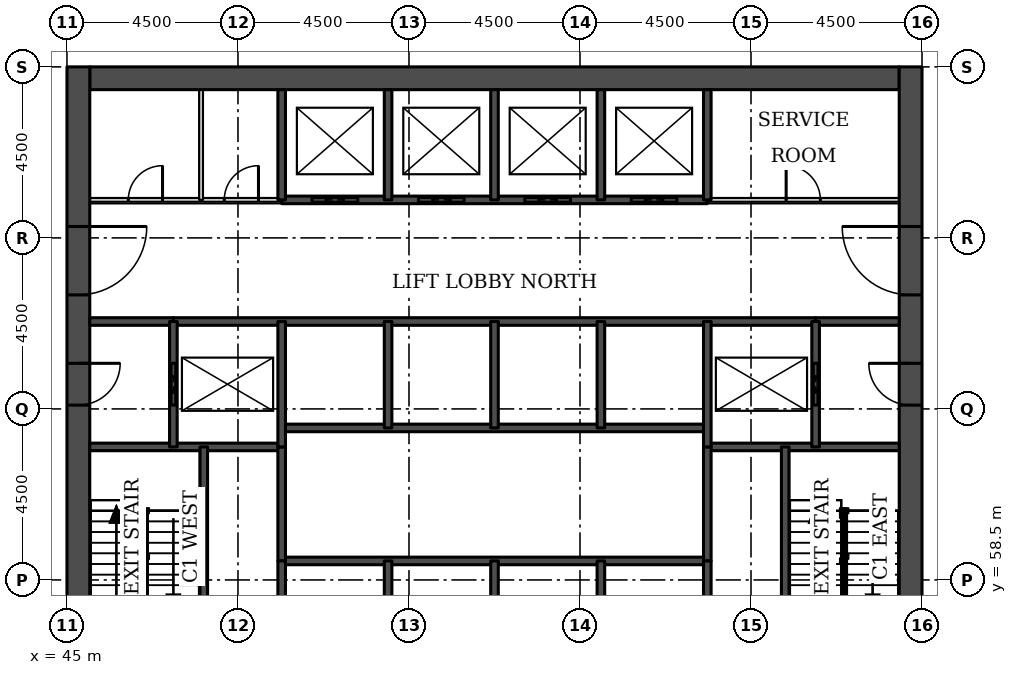
"""IFC4 building model, lengths in metres.
Left out: names, types, materials, properties, quantities, classifications, styles, units other than length and angle.
Written with IfcOpenShell. Run it as: python <this file> out.ifc"""

import sys

from ifc_helpers import new_model, si_unit, direction, frame, frame_2d, origin, place, context, subcontext, project, spatial, rectangle, extrude, element, fill, save


model = new_model("IFC4")
c1 = context("Model", 3, precision=1e-05, world=origin(), true_north=direction((0.0, 1.0)))
c2 = subcontext(c1, "Body", "Model", "MODEL_VIEW")
j1 = project(units=[si_unit("LENGTHUNIT", "METRE"), si_unit("PLANEANGLEUNIT", "RADIAN")], contexts=[c1])
p1 = place(None, origin())
s1 = spatial("IfcSite", under=j1, at=p1, CompositionType="ELEMENT")
p2 = place(p1, origin())
s2 = spatial("IfcBuilding", under=s1, at=p2, CompositionType="ELEMENT")
p3 = place(p2, frame((0.0, 0.0, 8.0)))
s3 = spatial("IfcBuildingStorey", under=s2, at=p3, CompositionType="ELEMENT", Elevation=8.0)
p4 = place(p3, frame((45.6, 71.7, 0.0), z_axis=(0.0, 0.0, 1.0), x_axis=(1.0, 0.0, 0.0)))
e1 = element("IfcWall", 1, at=p4, inside=s3, PredefinedType="SHEAR", context=c2, shape_type="SweptSolid", body=[
    extrude(rectangle(XDim=21.3, YDim=0.6, at=frame_2d((10.65, 0.0))), origin(), (0.0, 0.0, 1.0), 5.5),
])
p5 = place(p3, frame((45.3, 49.5, 0.0), z_axis=(0.0, 0.0, 1.0), x_axis=(0.0, 1.0, 0.0)))
e2 = element("IfcWall", 2, at=p5, inside=s3, PredefinedType="SHEAR", context=c2, shape_type="SweptSolid", body=[
    extrude(rectangle(XDim=22.5, YDim=0.6, at=frame_2d((11.25, 0.0))), origin(), (0.0, 0.0, 1.0), 5.5),
])
p6 = place(p5, frame((4.2, 0.0, 0.0)))
e3 = element("IfcOpeningElement", 3, at=p6, cuts=e2, PredefinedType="OPENING", context=c2, shape_type="SweptSolid", body=[
    extrude(rectangle(XDim=1.8, YDim=2.1, at=frame_2d((0.9, 1.05))), frame((0.0, 0.31, 0.0), z_axis=(0.0, -1.0, 0.0), x_axis=(1.0, 0.0, 0.0)), (0.0, 0.0, 1.0), 0.62),
])
p7 = place(p5, frame((6.9, 0.0, 0.0)))
e4 = element("IfcOpeningElement", 4, at=p7, cuts=e2, PredefinedType="OPENING", context=c2, shape_type="SweptSolid", body=[
    extrude(rectangle(XDim=1.1, YDim=2.1, at=frame_2d((0.55, 1.05))), frame((0.0, 0.31, 0.0), z_axis=(0.0, -1.0, 0.0), x_axis=(1.0, 0.0, 0.0)), (0.0, 0.0, 1.0), 0.62),
])
p8 = place(p5, frame((13.6, 0.0, 0.0)))
e5 = element("IfcOpeningElement", 5, at=p8, cuts=e2, PredefinedType="OPENING", context=c2, shape_type="SweptSolid", body=[
    extrude(rectangle(XDim=1.1, YDim=2.1, at=frame_2d((0.55, 1.05))), frame((0.0, 0.31, 0.0), z_axis=(0.0, -1.0, 0.0), x_axis=(1.0, 0.0, 0.0)), (0.0, 0.0, 1.0), 0.62),
])
p9 = place(p5, frame((16.5, 0.0, 0.0)))
e6 = element("IfcOpeningElement", 6, at=p9, cuts=e2, PredefinedType="OPENING", context=c2, shape_type="SweptSolid", body=[
    extrude(rectangle(XDim=1.8, YDim=2.1, at=frame_2d((0.9, 1.05))), frame((0.0, 0.31, 0.0), z_axis=(0.0, -1.0, 0.0), x_axis=(1.0, 0.0, 0.0)), (0.0, 0.0, 1.0), 0.62),
])
p10 = place(p3, frame((67.2, 49.5, 0.0), z_axis=(0.0, 0.0, 1.0), x_axis=(0.0, 1.0, 0.0)))
e7 = element("IfcWall", 7, at=p10, inside=s3, PredefinedType="SHEAR", context=c2, shape_type="SweptSolid", body=[
    extrude(rectangle(XDim=22.5, YDim=0.6, at=frame_2d((11.25, 0.0))), origin(), (0.0, 0.0, 1.0), 5.5),
])
p11 = place(p10, frame((4.2, 0.0, 0.0)))
e8 = element("IfcOpeningElement", 8, at=p11, cuts=e7, PredefinedType="OPENING", context=c2, shape_type="SweptSolid", body=[
    extrude(rectangle(XDim=1.8, YDim=2.1, at=frame_2d((0.9, 1.05))), frame((0.0, 0.31, 0.0), z_axis=(0.0, -1.0, 0.0), x_axis=(1.0, 0.0, 0.0)), (0.0, 0.0, 1.0), 0.62),
])
p12 = place(p10, frame((6.9, 0.0, 0.0)))
e9 = element("IfcOpeningElement", 9, at=p12, cuts=e7, PredefinedType="OPENING", context=c2, shape_type="SweptSolid", body=[
    extrude(rectangle(XDim=1.1, YDim=2.1, at=frame_2d((0.55, 1.05))), frame((0.0, 0.31, 0.0), z_axis=(0.0, -1.0, 0.0), x_axis=(1.0, 0.0, 0.0)), (0.0, 0.0, 1.0), 0.62),
])
p13 = place(p10, frame((13.6, 0.0, 0.0)))
e10 = element("IfcOpeningElement", 10, at=p13, cuts=e7, PredefinedType="OPENING", context=c2, shape_type="SweptSolid", body=[
    extrude(rectangle(XDim=1.1, YDim=2.1, at=frame_2d((0.55, 1.05))), frame((0.0, 0.31, 0.0), z_axis=(0.0, -1.0, 0.0), x_axis=(1.0, 0.0, 0.0)), (0.0, 0.0, 1.0), 0.62),
])
p14 = place(p10, frame((16.5, 0.0, 0.0)))
e11 = element("IfcOpeningElement", 11, at=p14, cuts=e7, PredefinedType="OPENING", context=c2, shape_type="SweptSolid", body=[
    extrude(rectangle(XDim=1.8, YDim=2.1, at=frame_2d((0.9, 1.05))), frame((0.0, 0.31, 0.0), z_axis=(0.0, -1.0, 0.0), x_axis=(1.0, 0.0, 0.0)), (0.0, 0.0, 1.0), 0.62),
])
p15 = place(p3, frame((50.65, 59.0, 0.0), z_axis=(0.0, 0.0, 1.0), x_axis=(1.0, 0.0, 0.0)))
e12 = element("IfcWall", 12, at=p15, inside=s3, PredefinedType="SOLIDWALL", context=c2, shape_type="SweptSolid", body=[
    extrude(rectangle(XDim=11.2, YDim=0.2, at=frame_2d((5.6, 0.0))), origin(), (0.0, 0.0, 1.0), 5.5),
])
for number, where, z_axis, x_axis in (
    (13, (45.6, 62.0, 0.0), (0.0, 0.0, 1.0), (1.0, 0.0, 0.0)),
    (14, (61.85, 62.0, 0.0), (0.0, 0.0, 1.0), (1.0, 0.0, 0.0)),
):
    element("IfcWall", number, at=place(p3, frame(where, z_axis=z_axis, x_axis=x_axis)), inside=s3, PredefinedType="SOLIDWALL", context=c2, shape_type="SweptSolid", body=[
        extrude(rectangle(XDim=5.05, YDim=0.2, at=frame_2d((2.525, 0.0))), origin(), (0.0, 0.0, 1.0), 5.15),
    ])
p16 = place(p3, frame((50.65, 62.5, 0.0), z_axis=(0.0, 0.0, 1.0), x_axis=(1.0, 0.0, 0.0)))
e15 = element("IfcWall", 15, at=p16, inside=s3, PredefinedType="SOLIDWALL", context=c2, shape_type="SweptSolid", body=[
    extrude(rectangle(XDim=11.2, YDim=0.2, at=frame_2d((5.6, 0.0))), origin(), (0.0, 0.0, 1.0), 5.5),
])
for number, where, z_axis, x_axis in (
    (16, (45.6, 65.3, 0.0), (0.0, 0.0, 1.0), (1.0, 0.0, 0.0)),
    (17, (64.7, 65.3, 0.0), (0.0, 0.0, 1.0), (1.0, 0.0, 0.0)),
):
    element("IfcWall", number, at=place(p3, frame(where, z_axis=z_axis, x_axis=x_axis)), inside=s3, PredefinedType="SOLIDWALL", context=c2, shape_type="SweptSolid", body=[
        extrude(rectangle(XDim=2.2, YDim=0.2, at=frame_2d((1.1, 0.0))), origin(), (0.0, 0.0, 1.0), 5.15),
    ])
p17 = place(p3, frame((47.8, 65.3, 0.0), z_axis=(0.0, 0.0, 1.0), x_axis=(1.0, 0.0, 0.0)))
e18 = element("IfcWall", 18, at=p17, inside=s3, PredefinedType="SOLIDWALL", context=c2, shape_type="SweptSolid", body=[
    extrude(rectangle(XDim=16.9, YDim=0.2, at=frame_2d((8.45, 0.0))), origin(), (0.0, 0.0, 1.0), 5.15),
])
p18 = place(p3, frame((45.6, 68.5, 0.0), z_axis=(0.0, 0.0, 1.0), x_axis=(1.0, 0.0, 0.0)))
e19 = element("IfcWall", 19, at=p18, inside=s3, PredefinedType="PARTITIONING", context=c2, shape_type="SweptSolid", body=[
    extrude(rectangle(XDim=5.05, YDim=0.1, at=frame_2d((2.525, 0.0))), origin(), (0.0, 0.0, 1.0), 5.15),
])
p19 = place(p18, frame((1.014, 0.0, 0.0)))
e20 = element("IfcOpeningElement", 20, at=p19, cuts=e19, PredefinedType="OPENING", context=c2, shape_type="SweptSolid", body=[
    extrude(rectangle(XDim=0.9, YDim=2.1, at=frame_2d((0.45, 1.05))), frame((0.0, 0.06, 0.0), z_axis=(0.0, -1.0, 0.0), x_axis=(1.0, 0.0, 0.0)), (0.0, 0.0, 1.0), 0.12),
])
p20 = place(p18, frame((3.54, 0.0, 0.0)))
e21 = element("IfcOpeningElement", 21, at=p20, cuts=e19, PredefinedType="OPENING", context=c2, shape_type="SweptSolid", body=[
    extrude(rectangle(XDim=0.9, YDim=2.1, at=frame_2d((0.45, 1.05))), frame((0.0, 0.06, 0.0), z_axis=(0.0, -1.0, 0.0), x_axis=(1.0, 0.0, 0.0)), (0.0, 0.0, 1.0), 0.12),
])
p21 = place(p3, frame((61.85, 68.5, 0.0), z_axis=(0.0, 0.0, 1.0), x_axis=(1.0, 0.0, 0.0)))
e22 = element("IfcWall", 22, at=p21, inside=s3, PredefinedType="PARTITIONING", context=c2, shape_type="SweptSolid", body=[
    extrude(rectangle(XDim=5.05, YDim=0.1, at=frame_2d((2.525, 0.0))), origin(), (0.0, 0.0, 1.0), 5.15),
])
p22 = place(p21, frame((2.075, 0.0, 0.0)))
e23 = element("IfcOpeningElement", 23, at=p22, cuts=e22, PredefinedType="OPENING", context=c2, shape_type="SweptSolid", body=[
    extrude(rectangle(XDim=0.9, YDim=2.1, at=frame_2d((0.45, 1.05))), frame((0.0, 0.06, 0.0), z_axis=(0.0, -1.0, 0.0), x_axis=(1.0, 0.0, 0.0)), (0.0, 0.0, 1.0), 0.12),
])
p23 = place(p3, frame((50.65, 68.5, 0.0), z_axis=(0.0, 0.0, 1.0), x_axis=(1.0, 0.0, 0.0)))
e24 = element("IfcWall", 24, at=p23, inside=s3, PredefinedType="SOLIDWALL", context=c2, shape_type="SweptSolid", body=[
    extrude(rectangle(XDim=11.2, YDim=0.2, at=frame_2d((5.6, 0.0))), origin(), (0.0, 0.0, 1.0), 5.15),
])
p24 = place(p23, frame((0.8, 0.0, 0.0)))
e25 = element("IfcOpeningElement", 25, at=p24, cuts=e24, PredefinedType="OPENING", context=c2, shape_type="SweptSolid", body=[
    extrude(rectangle(XDim=1.2, YDim=2.1, at=frame_2d((0.6, 1.05))), frame((0.0, 0.11, 0.0), z_axis=(0.0, -1.0, 0.0), x_axis=(1.0, 0.0, 0.0)), (0.0, 0.0, 1.0), 0.22),
])
p25 = place(p23, frame((3.6, 0.0, 0.0)))
e26 = element("IfcOpeningElement", 26, at=p25, cuts=e24, PredefinedType="OPENING", context=c2, shape_type="SweptSolid", body=[
    extrude(rectangle(XDim=1.2, YDim=2.1, at=frame_2d((0.6, 1.05))), frame((0.0, 0.11, 0.0), z_axis=(0.0, -1.0, 0.0), x_axis=(1.0, 0.0, 0.0)), (0.0, 0.0, 1.0), 0.22),
])
p26 = place(p23, frame((6.4, 0.0, 0.0)))
e27 = element("IfcOpeningElement", 27, at=p26, cuts=e24, PredefinedType="OPENING", context=c2, shape_type="SweptSolid", body=[
    extrude(rectangle(XDim=1.2, YDim=2.1, at=frame_2d((0.6, 1.05))), frame((0.0, 0.11, 0.0), z_axis=(0.0, -1.0, 0.0), x_axis=(1.0, 0.0, 0.0)), (0.0, 0.0, 1.0), 0.22),
])
p27 = place(p23, frame((9.2, 0.0, 0.0)))
e28 = element("IfcOpeningElement", 28, at=p27, cuts=e24, PredefinedType="OPENING", context=c2, shape_type="SweptSolid", body=[
    extrude(rectangle(XDim=1.2, YDim=2.1, at=frame_2d((0.6, 1.05))), frame((0.0, 0.11, 0.0), z_axis=(0.0, -1.0, 0.0), x_axis=(1.0, 0.0, 0.0)), (0.0, 0.0, 1.0), 0.22),
])
p28 = place(p3, frame((47.8, 62.0, 0.0), z_axis=(0.0, 0.0, 1.0), x_axis=(0.0, 1.0, 0.0)))
e29 = element("IfcWall", 29, at=p28, inside=s3, PredefinedType="SOLIDWALL", context=c2, shape_type="SweptSolid", body=[
    extrude(rectangle(XDim=3.3, YDim=0.2, at=frame_2d((1.65, 0.0))), origin(), (0.0, 0.0, 1.0), 5.15),
])
p29 = place(p28, frame((1.1, 0.0, 0.0)))
e30 = element("IfcOpeningElement", 30, at=p29, cuts=e29, PredefinedType="OPENING", context=c2, shape_type="SweptSolid", body=[
    extrude(rectangle(XDim=1.1, YDim=2.1, at=frame_2d((0.55, 1.05))), frame((0.0, 0.11, 0.0), z_axis=(0.0, -1.0, 0.0), x_axis=(1.0, 0.0, 0.0)), (0.0, 0.0, 1.0), 0.22),
])
p30 = place(p3, frame((48.529, 68.5, 0.0), z_axis=(0.0, 0.0, 1.0), x_axis=(0.0, 1.0, 0.0)))
e31 = element("IfcWall", 31, at=p30, inside=s3, PredefinedType="PARTITIONING", context=c2, shape_type="SweptSolid", body=[
    extrude(rectangle(XDim=2.9, YDim=0.1, at=frame_2d((1.45, 0.0))), origin(), (0.0, 0.0, 1.0), 5.15),
])
p31 = place(p3, frame((48.6, 56.2, 0.0), z_axis=(0.0, 0.0, 1.0), x_axis=(0.0, 1.0, 0.0)))
e32 = element("IfcWall", 32, at=p31, inside=s3, PredefinedType="SOLIDWALL", context=c2, shape_type="SweptSolid", body=[
    extrude(rectangle(XDim=5.8, YDim=0.2, at=frame_2d((2.9, 0.0))), origin(), (0.0, 0.0, 1.0), 5.15),
])
p32 = place(p3, frame((50.65, 59.0, 0.0), z_axis=(0.0, 0.0, 1.0), x_axis=(0.0, 1.0, 0.0)))
e33 = element("IfcWall", 33, at=p32, inside=s3, PredefinedType="SOLIDWALL", context=c2, shape_type="SweptSolid", body=[
    extrude(rectangle(XDim=3.0, YDim=0.2, at=frame_2d((1.5, 0.0))), origin(), (0.0, 0.0, 1.0), 5.5),
])
p33 = place(p3, frame((50.65, 56.2, 0.0), z_axis=(0.0, 0.0, 1.0), x_axis=(0.0, 1.0, 0.0)))
e34 = element("IfcWall", 34, at=p33, inside=s3, PredefinedType="SOLIDWALL", context=c2, shape_type="SweptSolid", body=[
    extrude(rectangle(XDim=2.8, YDim=0.2, at=frame_2d((1.4, 0.0))), origin(), (0.0, 0.0, 1.0), 5.15),
])
p34 = place(p3, frame((50.65, 62.0, 0.0), z_axis=(0.0, 0.0, 1.0), x_axis=(0.0, 1.0, 0.0)))
e35 = element("IfcWall", 35, at=p34, inside=s3, PredefinedType="SOLIDWALL", context=c2, shape_type="SweptSolid", body=[
    extrude(rectangle(XDim=3.3, YDim=0.2, at=frame_2d((1.65, 0.0))), origin(), (0.0, 0.0, 1.0), 5.15),
])
p35 = place(p3, frame((50.65, 68.5, 0.0), z_axis=(0.0, 0.0, 1.0), x_axis=(0.0, 1.0, 0.0)))
e36 = element("IfcWall", 36, at=p35, inside=s3, PredefinedType="SOLIDWALL", context=c2, shape_type="SweptSolid", body=[
    extrude(rectangle(XDim=2.9, YDim=0.2, at=frame_2d((1.45, 0.0))), origin(), (0.0, 0.0, 1.0), 5.15),
])
for number, where, z_axis, x_axis in (
    (37, (53.45, 56.2, 0.0), (0.0, 0.0, 1.0), (0.0, 1.0, 0.0)),
    (38, (53.45, 62.5, 0.0), (0.0, 0.0, 1.0), (0.0, 1.0, 0.0)),
):
    element("IfcWall", number, at=place(p3, frame(where, z_axis=z_axis, x_axis=x_axis)), inside=s3, PredefinedType="SOLIDWALL", context=c2, shape_type="SweptSolid", body=[
        extrude(rectangle(XDim=2.8, YDim=0.2, at=frame_2d((1.4, 0.0))), origin(), (0.0, 0.0, 1.0), 5.15),
    ])
p36 = place(p3, frame((53.45, 68.5, 0.0), z_axis=(0.0, 0.0, 1.0), x_axis=(0.0, 1.0, 0.0)))
e39 = element("IfcWall", 39, at=p36, inside=s3, PredefinedType="SOLIDWALL", context=c2, shape_type="SweptSolid", body=[
    extrude(rectangle(XDim=2.9, YDim=0.2, at=frame_2d((1.45, 0.0))), origin(), (0.0, 0.0, 1.0), 5.15),
])
for number, where, z_axis, x_axis in (
    (40, (56.25, 56.2, 0.0), (0.0, 0.0, 1.0), (0.0, 1.0, 0.0)),
    (41, (56.25, 62.5, 0.0), (0.0, 0.0, 1.0), (0.0, 1.0, 0.0)),
):
    element("IfcWall", number, at=place(p3, frame(where, z_axis=z_axis, x_axis=x_axis)), inside=s3, PredefinedType="SOLIDWALL", context=c2, shape_type="SweptSolid", body=[
        extrude(rectangle(XDim=2.8, YDim=0.2, at=frame_2d((1.4, 0.0))), origin(), (0.0, 0.0, 1.0), 5.15),
    ])
p37 = place(p3, frame((56.25, 68.5, 0.0), z_axis=(0.0, 0.0, 1.0), x_axis=(0.0, 1.0, 0.0)))
e42 = element("IfcWall", 42, at=p37, inside=s3, PredefinedType="SOLIDWALL", context=c2, shape_type="SweptSolid", body=[
    extrude(rectangle(XDim=2.9, YDim=0.2, at=frame_2d((1.45, 0.0))), origin(), (0.0, 0.0, 1.0), 5.15),
])
for number, where, z_axis, x_axis in (
    (43, (59.05, 56.2, 0.0), (0.0, 0.0, 1.0), (0.0, 1.0, 0.0)),
    (44, (59.05, 62.5, 0.0), (0.0, 0.0, 1.0), (0.0, 1.0, 0.0)),
):
    element("IfcWall", number, at=place(p3, frame(where, z_axis=z_axis, x_axis=x_axis)), inside=s3, PredefinedType="SOLIDWALL", context=c2, shape_type="SweptSolid", body=[
        extrude(rectangle(XDim=2.8, YDim=0.2, at=frame_2d((1.4, 0.0))), origin(), (0.0, 0.0, 1.0), 5.15),
    ])
p38 = place(p3, frame((59.05, 68.5, 0.0), z_axis=(0.0, 0.0, 1.0), x_axis=(0.0, 1.0, 0.0)))
e45 = element("IfcWall", 45, at=p38, inside=s3, PredefinedType="SOLIDWALL", context=c2, shape_type="SweptSolid", body=[
    extrude(rectangle(XDim=2.9, YDim=0.2, at=frame_2d((1.45, 0.0))), origin(), (0.0, 0.0, 1.0), 5.15),
])
p39 = place(p3, frame((61.85, 59.0, 0.0), z_axis=(0.0, 0.0, 1.0), x_axis=(0.0, 1.0, 0.0)))
e46 = element("IfcWall", 46, at=p39, inside=s3, PredefinedType="SOLIDWALL", context=c2, shape_type="SweptSolid", body=[
    extrude(rectangle(XDim=3.0, YDim=0.2, at=frame_2d((1.5, 0.0))), origin(), (0.0, 0.0, 1.0), 5.5),
])
p40 = place(p3, frame((61.85, 56.2, 0.0), z_axis=(0.0, 0.0, 1.0), x_axis=(0.0, 1.0, 0.0)))
e47 = element("IfcWall", 47, at=p40, inside=s3, PredefinedType="SOLIDWALL", context=c2, shape_type="SweptSolid", body=[
    extrude(rectangle(XDim=2.8, YDim=0.2, at=frame_2d((1.4, 0.0))), origin(), (0.0, 0.0, 1.0), 5.15),
])
p41 = place(p3, frame((61.85, 62.0, 0.0), z_axis=(0.0, 0.0, 1.0), x_axis=(0.0, 1.0, 0.0)))
e48 = element("IfcWall", 48, at=p41, inside=s3, PredefinedType="SOLIDWALL", context=c2, shape_type="SweptSolid", body=[
    extrude(rectangle(XDim=3.3, YDim=0.2, at=frame_2d((1.65, 0.0))), origin(), (0.0, 0.0, 1.0), 5.15),
])
p42 = place(p3, frame((61.85, 68.5, 0.0), z_axis=(0.0, 0.0, 1.0), x_axis=(0.0, 1.0, 0.0)))
e49 = element("IfcWall", 49, at=p42, inside=s3, PredefinedType="SOLIDWALL", context=c2, shape_type="SweptSolid", body=[
    extrude(rectangle(XDim=2.9, YDim=0.2, at=frame_2d((1.45, 0.0))), origin(), (0.0, 0.0, 1.0), 5.15),
])
p43 = place(p3, frame((63.9, 56.2, 0.0), z_axis=(0.0, 0.0, 1.0), x_axis=(0.0, 1.0, 0.0)))
e50 = element("IfcWall", 50, at=p43, inside=s3, PredefinedType="SOLIDWALL", context=c2, shape_type="SweptSolid", body=[
    extrude(rectangle(XDim=5.8, YDim=0.2, at=frame_2d((2.9, 0.0))), origin(), (0.0, 0.0, 1.0), 5.15),
])
p44 = place(p3, frame((64.7, 62.0, 0.0), z_axis=(0.0, 0.0, 1.0), x_axis=(0.0, 1.0, 0.0)))
e51 = element("IfcWall", 51, at=p44, inside=s3, PredefinedType="SOLIDWALL", context=c2, shape_type="SweptSolid", body=[
    extrude(rectangle(XDim=3.3, YDim=0.2, at=frame_2d((1.65, 0.0))), origin(), (0.0, 0.0, 1.0), 5.15),
])
p45 = place(p44, frame((1.1, 0.0, 0.0)))
e52 = element("IfcOpeningElement", 52, at=p45, cuts=e51, PredefinedType="OPENING", context=c2, shape_type="SweptSolid", body=[
    extrude(rectangle(XDim=1.1, YDim=2.1, at=frame_2d((0.55, 1.05))), frame((0.0, 0.11, 0.0), z_axis=(0.0, -1.0, 0.0), x_axis=(1.0, 0.0, 0.0)), (0.0, 0.0, 1.0), 0.22),
])
p46 = place(p24, origin())
e53 = element("IfcDoor", 53, at=p46, inside=s3, OperationType="DOUBLE_DOOR_SLIDING", PredefinedType="DOOR", context=c2, shape_type="SweptSolid", body=[
    extrude(rectangle(XDim=1.2, YDim=2.1, at=frame_2d((0.6, 1.05))), frame((0.0, 0.025, 0.0), z_axis=(0.0, -1.0, 0.0), x_axis=(1.0, 0.0, 0.0)), (0.0, 0.0, 1.0), 0.05),
])
fill(e25, e53)
p47 = place(p25, origin())
e54 = element("IfcDoor", 54, at=p47, inside=s3, OperationType="DOUBLE_DOOR_SLIDING", PredefinedType="DOOR", context=c2, shape_type="SweptSolid", body=[
    extrude(rectangle(XDim=1.2, YDim=2.1, at=frame_2d((0.6, 1.05))), frame((0.0, 0.025, 0.0), z_axis=(0.0, -1.0, 0.0), x_axis=(1.0, 0.0, 0.0)), (0.0, 0.0, 1.0), 0.05),
])
fill(e26, e54)
p48 = place(p26, origin())
e55 = element("IfcDoor", 55, at=p48, inside=s3, OperationType="DOUBLE_DOOR_SLIDING", PredefinedType="DOOR", context=c2, shape_type="SweptSolid", body=[
    extrude(rectangle(XDim=1.2, YDim=2.1, at=frame_2d((0.6, 1.05))), frame((0.0, 0.025, 0.0), z_axis=(0.0, -1.0, 0.0), x_axis=(1.0, 0.0, 0.0)), (0.0, 0.0, 1.0), 0.05),
])
fill(e27, e55)
p49 = place(p27, origin())
e56 = element("IfcDoor", 56, at=p49, inside=s3, OperationType="DOUBLE_DOOR_SLIDING", PredefinedType="DOOR", context=c2, shape_type="SweptSolid", body=[
    extrude(rectangle(XDim=1.2, YDim=2.1, at=frame_2d((0.6, 1.05))), frame((0.0, 0.025, 0.0), z_axis=(0.0, -1.0, 0.0), x_axis=(1.0, 0.0, 0.0)), (0.0, 0.0, 1.0), 0.05),
])
fill(e28, e56)
p50 = place(p29, origin())
e57 = element("IfcDoor", 57, at=p50, inside=s3, OperationType="DOUBLE_DOOR_SLIDING", PredefinedType="DOOR", context=c2, shape_type="SweptSolid", body=[
    extrude(rectangle(XDim=1.1, YDim=2.1, at=frame_2d((0.55, 1.05))), frame((0.0, 0.025, 0.0), z_axis=(0.0, -1.0, 0.0), x_axis=(1.0, 0.0, 0.0)), (0.0, 0.0, 1.0), 0.05),
])
fill(e30, e57)
p51 = place(p45, origin())
e58 = element("IfcDoor", 58, at=p51, inside=s3, OperationType="DOUBLE_DOOR_SLIDING", PredefinedType="DOOR", context=c2, shape_type="SweptSolid", body=[
    extrude(rectangle(XDim=1.1, YDim=2.1, at=frame_2d((0.55, 1.05))), frame((0.0, 0.025, 0.0), z_axis=(0.0, -1.0, 0.0), x_axis=(1.0, 0.0, 0.0)), (0.0, 0.0, 1.0), 0.05),
])
fill(e52, e58)
p52 = place(p8, frame((1.1, 0.0, 0.0), z_axis=(0.0, 0.0, 1.0), x_axis=(-1.0, 0.0, 0.0)))
e59 = element("IfcDoor", 59, at=p52, inside=s3, OperationType="SINGLE_SWING_LEFT", PredefinedType="DOOR", context=c2, shape_type="SweptSolid", body=[
    extrude(rectangle(XDim=1.1, YDim=2.1, at=frame_2d((0.55, 1.05))), frame((0.0, 0.025, 0.0), z_axis=(0.0, -1.0, 0.0), x_axis=(1.0, 0.0, 0.0)), (0.0, 0.0, 1.0), 0.05),
])
fill(e5, e59)
p53 = place(p9, frame((1.8, 0.0, 0.0), z_axis=(0.0, 0.0, 1.0), x_axis=(-1.0, 0.0, 0.0)))
e60 = element("IfcDoor", 60, at=p53, inside=s3, OperationType="SINGLE_SWING_LEFT", PredefinedType="DOOR", context=c2, shape_type="SweptSolid", body=[
    extrude(rectangle(XDim=1.8, YDim=2.1, at=frame_2d((0.9, 1.05))), frame((0.0, 0.025, 0.0), z_axis=(0.0, -1.0, 0.0), x_axis=(1.0, 0.0, 0.0)), (0.0, 0.0, 1.0), 0.05),
])
fill(e6, e60)
p54 = place(p13, origin())
e61 = element("IfcDoor", 61, at=p54, inside=s3, OperationType="SINGLE_SWING_RIGHT", PredefinedType="DOOR", context=c2, shape_type="SweptSolid", body=[
    extrude(rectangle(XDim=1.1, YDim=2.1, at=frame_2d((0.55, 1.05))), frame((0.0, 0.025, 0.0), z_axis=(0.0, -1.0, 0.0), x_axis=(1.0, 0.0, 0.0)), (0.0, 0.0, 1.0), 0.05),
])
fill(e10, e61)
p55 = place(p14, origin())
e62 = element("IfcDoor", 62, at=p55, inside=s3, OperationType="SINGLE_SWING_RIGHT", PredefinedType="DOOR", context=c2, shape_type="SweptSolid", body=[
    extrude(rectangle(XDim=1.8, YDim=2.1, at=frame_2d((0.9, 1.05))), frame((0.0, 0.025, 0.0), z_axis=(0.0, -1.0, 0.0), x_axis=(1.0, 0.0, 0.0)), (0.0, 0.0, 1.0), 0.05),
])
fill(e11, e62)
p56 = place(p22, origin())
e63 = element("IfcDoor", 63, at=p56, inside=s3, OperationType="SINGLE_SWING_LEFT", PredefinedType="DOOR", context=c2, shape_type="SweptSolid", body=[
    extrude(rectangle(XDim=0.9, YDim=2.1, at=frame_2d((0.45, 1.05))), frame((0.0, 0.025, 0.0), z_axis=(0.0, -1.0, 0.0), x_axis=(1.0, 0.0, 0.0)), (0.0, 0.0, 1.0), 0.05),
])
fill(e23, e63)
p57 = place(p19, origin())
e64 = element("IfcDoor", 64, at=p57, inside=s3, OperationType="SINGLE_SWING_RIGHT", PredefinedType="DOOR", context=c2, shape_type="SweptSolid", body=[
    extrude(rectangle(XDim=0.9, YDim=2.1, at=frame_2d((0.45, 1.05))), frame((0.0, 0.025, 0.0), z_axis=(0.0, -1.0, 0.0), x_axis=(1.0, 0.0, 0.0)), (0.0, 0.0, 1.0), 0.05),
])
fill(e20, e64)
p58 = place(p20, origin())
e65 = element("IfcDoor", 65, at=p58, inside=s3, OperationType="SINGLE_SWING_RIGHT", PredefinedType="DOOR", context=c2, shape_type="SweptSolid", body=[
    extrude(rectangle(XDim=0.9, YDim=2.1, at=frame_2d((0.45, 1.05))), frame((0.0, 0.025, 0.0), z_axis=(0.0, -1.0, 0.0), x_axis=(1.0, 0.0, 0.0)), (0.0, 0.0, 1.0), 0.05),
])
fill(e21, e65)
save(model, sys.argv[1])
